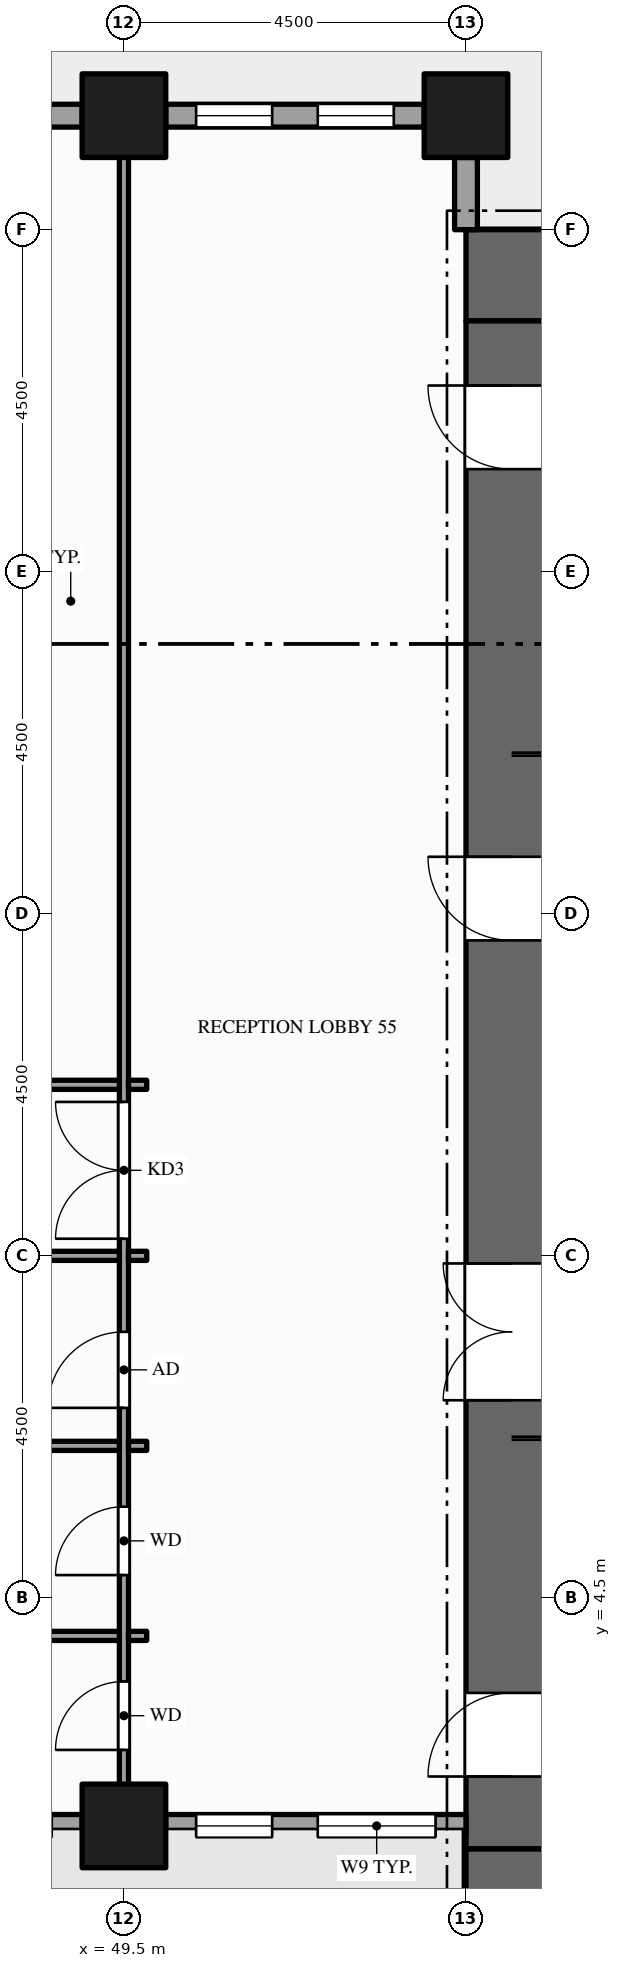
"""IFC4 building model, lengths in metres.
Left out: names, types, materials, properties, quantities, classifications, styles, units other than length and angle.
Written with IfcOpenShell. Run it as: python <this file> out.ifc"""

import sys

from ifc_helpers import new_model, si_unit, direction, frame, frame_2d, origin, origin_2d, place, context, subcontext, project, spatial, rectangle, hollow_rectangle, extrude, element, fill, save


model = new_model("IFC4")
c1 = context("Model", 3, precision=1e-05, world=origin(), true_north=direction((0.0, 1.0)))
c2 = subcontext(c1, "Body", "Model", "MODEL_VIEW")
j1 = project(units=[si_unit("LENGTHUNIT", "METRE"), si_unit("PLANEANGLEUNIT", "RADIAN")], contexts=[c1])
p1 = place(None, origin())
s1 = spatial("IfcSite", under=j1, at=p1, CompositionType="ELEMENT")
p2 = place(p1, origin())
s2 = spatial("IfcBuilding", under=s1, at=p2, CompositionType="ELEMENT")
p3 = place(p2, frame((0.0, 0.0, 29.0)))
s3 = spatial("IfcBuildingStorey", under=s2, at=p3, CompositionType="ELEMENT", Elevation=29.0)
for number, where, z_axis, x_axis in (
    (1, (67.5, 0.6, -0.15), (0.0, 0.0, 1.0), (-1.0, 0.0, 0.0)),
    (2, (54.0, 21.9, -0.15), (0.0, 0.0, 1.0), (1.0, 0.0, 0.0)),
):
    element("IfcWall", number, at=place(p3, frame(where, z_axis=z_axis, x_axis=x_axis)), inside=s3, PredefinedType="SHEAR", context=c2, shape_type="SweptSolid", body=[
        extrude(rectangle(XDim=13.5, YDim=1.2, at=frame_2d((6.75, 0.0))), origin(), (0.0, 0.0, 1.0), 4.0),
    ])
p4 = place(p3, frame((54.6, 1.2, -0.15), z_axis=(0.0, 0.0, 1.0), x_axis=(0.0, 1.0, 0.0)))
e3 = element("IfcWall", 3, at=p4, inside=s3, PredefinedType="SHEAR", context=c2, shape_type="SweptSolid", body=[
    extrude(rectangle(XDim=20.1, YDim=1.2, at=frame_2d((10.05, 0.0))), origin(), (0.0, 0.0, 1.0), 4.0),
])
p5 = place(p4, frame((5.9, 0.0, 0.15)))
e4 = element("IfcOpeningElement", 4, at=p5, cuts=e3, PredefinedType="OPENING", context=c2, shape_type="SweptSolid", body=[
    extrude(rectangle(XDim=1.8, YDim=2.1, at=frame_2d((0.9, 1.05))), frame((0.0, 0.61, 0.0), z_axis=(0.0, -1.0, 0.0), x_axis=(1.0, 0.0, 0.0)), (0.0, 0.0, 1.0), 1.22),
])
p6 = place(p4, frame((11.95, 0.0, 0.15)))
e5 = element("IfcOpeningElement", 5, at=p6, cuts=e3, PredefinedType="OPENING", context=c2, shape_type="SweptSolid", body=[
    extrude(rectangle(XDim=1.1, YDim=2.1, at=frame_2d((0.55, 1.05))), frame((0.0, 0.61, 0.0), z_axis=(0.0, -1.0, 0.0), x_axis=(1.0, 0.0, 0.0)), (0.0, 0.0, 1.0), 1.22),
])
p7 = place(p4, frame((0.95, 0.0, 0.15)))
e6 = element("IfcOpeningElement", 6, at=p7, cuts=e3, PredefinedType="OPENING", context=c2, shape_type="SweptSolid", body=[
    extrude(rectangle(XDim=1.1, YDim=2.1, at=frame_2d((0.55, 1.05))), frame((0.0, 0.61, 0.0), z_axis=(0.0, -1.0, 0.0), x_axis=(1.0, 0.0, 0.0)), (0.0, 0.0, 1.0), 1.22),
])
p8 = place(p4, frame((18.15, 0.0, 0.15)))
e7 = element("IfcOpeningElement", 7, at=p8, cuts=e3, PredefinedType="OPENING", context=c2, shape_type="SweptSolid", body=[
    extrude(rectangle(XDim=1.1, YDim=2.1, at=frame_2d((0.55, 1.05))), frame((0.0, 0.61, 0.0), z_axis=(0.0, -1.0, 0.0), x_axis=(1.0, 0.0, 0.0)), (0.0, 0.0, 1.0), 1.22),
])
for number, where, z_axis, x_axis in (
    (8, (49.5, 1.5, -0.3), (0.0, 0.0, 1.0), (1.0, 0.0, 0.0)),
    (9, (49.5, 24.0, -0.3), (0.0, 0.0, 1.0), (1.0, 0.0, 0.0)),
    (10, (54.0, 24.0, -0.3), (0.0, 0.0, 1.0), (1.0, 0.0, 0.0)),
):
    element("IfcColumn", number, at=place(p3, frame(where, z_axis=z_axis, x_axis=x_axis)), inside=s3, PredefinedType="COLUMN", context=c2, shape_type="SweptSolid", body=[
        extrude(hollow_rectangle(XDim=1.1, YDim=1.1, WallThickness=0.06, at=origin_2d()), origin(), (0.0, 0.0, 1.0), 4.15),
    ])
p9 = place(p3, frame((45.55, 1.5, 0.0), z_axis=(0.0, 0.0, 1.0), x_axis=(1.0, 0.0, 0.0)))
e11 = element("IfcWall", 11, at=p9, inside=s3, PredefinedType="STANDARD", context=c2, shape_type="SweptSolid", body=[
    extrude(rectangle(XDim=3.4, YDim=0.3, at=frame_2d((1.7, 0.0))), origin(), (0.0, 0.0, 1.0), 3.144),
])
p10 = place(p9, frame((0.4, 0.0, 0.9)))
e12 = element("IfcOpeningElement", 12, at=p10, cuts=e11, PredefinedType="OPENING", context=c2, shape_type="SweptSolid", body=[
    extrude(rectangle(XDim=1.0, YDim=2.0, at=frame_2d((0.5, 1.0))), frame((0.0, 0.16, 0.0), z_axis=(0.0, -1.0, 0.0), x_axis=(1.0, 0.0, 0.0)), (0.0, 0.0, 1.0), 0.32),
])
p11 = place(p9, frame((2.0, 0.0, 0.9)))
e13 = element("IfcOpeningElement", 13, at=p11, cuts=e11, PredefinedType="OPENING", context=c2, shape_type="SweptSolid", body=[
    extrude(rectangle(XDim=1.0, YDim=2.0, at=frame_2d((0.5, 1.0))), frame((0.0, 0.16, 0.0), z_axis=(0.0, -1.0, 0.0), x_axis=(1.0, 0.0, 0.0)), (0.0, 0.0, 1.0), 0.32),
])
p12 = place(p3, frame((50.05, 1.5, 0.0), z_axis=(0.0, 0.0, 1.0), x_axis=(1.0, 0.0, 0.0)))
e14 = element("IfcWall", 14, at=p12, inside=s3, PredefinedType="STANDARD", context=c2, shape_type="SweptSolid", body=[
    extrude(rectangle(XDim=3.95, YDim=0.3, at=frame_2d((1.975, 0.0))), origin(), (0.0, 0.0, 1.0), 3.144),
])
p13 = place(p12, frame((0.4, 0.0, 0.9)))
e15 = element("IfcOpeningElement", 15, at=p13, cuts=e14, PredefinedType="OPENING", context=c2, shape_type="SweptSolid", body=[
    extrude(rectangle(XDim=1.0, YDim=2.0, at=frame_2d((0.5, 1.0))), frame((0.0, 0.16, 0.0), z_axis=(0.0, -1.0, 0.0), x_axis=(1.0, 0.0, 0.0)), (0.0, 0.0, 1.0), 0.32),
])
p14 = place(p12, frame((2.0, 0.0, 0.9)))
e16 = element("IfcOpeningElement", 16, at=p14, cuts=e14, PredefinedType="OPENING", context=c2, shape_type="SweptSolid", body=[
    extrude(rectangle(XDim=1.55, YDim=2.0, at=frame_2d((0.775, 1.0))), frame((0.0, 0.16, 0.0), z_axis=(0.0, -1.0, 0.0), x_axis=(1.0, 0.0, 0.0)), (0.0, 0.0, 1.0), 0.32),
])
p15 = place(p3, frame((54.0, 22.5, 0.0), z_axis=(0.0, 0.0, 1.0), x_axis=(0.0, 1.0, 0.0)))
e17 = element("IfcWall", 17, at=p15, inside=s3, PredefinedType="STANDARD", context=c2, shape_type="SweptSolid", body=[
    extrude(rectangle(XDim=0.95, YDim=0.3, at=frame_2d((0.475, 0.0))), origin(), (0.0, 0.0, 1.0), 3.144),
])
p16 = place(p3, frame((53.45, 24.0, 0.0), z_axis=(0.0, 0.0, 1.0), x_axis=(-1.0, 0.0, 0.0)))
e18 = element("IfcWall", 18, at=p16, inside=s3, PredefinedType="STANDARD", context=c2, shape_type="SweptSolid", body=[
    extrude(rectangle(XDim=3.4, YDim=0.3, at=frame_2d((1.7, 0.0))), origin(), (0.0, 0.0, 1.0), 3.144),
])
p17 = place(p16, frame((0.4, 0.0, 0.9)))
e19 = element("IfcOpeningElement", 19, at=p17, cuts=e18, PredefinedType="OPENING", context=c2, shape_type="SweptSolid", body=[
    extrude(rectangle(XDim=1.0, YDim=2.0, at=frame_2d((0.5, 1.0))), frame((0.0, 0.16, 0.0), z_axis=(0.0, -1.0, 0.0), x_axis=(1.0, 0.0, 0.0)), (0.0, 0.0, 1.0), 0.32),
])
p18 = place(p16, frame((2.0, 0.0, 0.9)))
e20 = element("IfcOpeningElement", 20, at=p18, cuts=e18, PredefinedType="OPENING", context=c2, shape_type="SweptSolid", body=[
    extrude(rectangle(XDim=1.0, YDim=2.0, at=frame_2d((0.5, 1.0))), frame((0.0, 0.16, 0.0), z_axis=(0.0, -1.0, 0.0), x_axis=(1.0, 0.0, 0.0)), (0.0, 0.0, 1.0), 0.32),
])
p19 = place(p3, frame((48.95, 24.0, 0.0), z_axis=(0.0, 0.0, 1.0), x_axis=(-1.0, 0.0, 0.0)))
e21 = element("IfcWall", 21, at=p19, inside=s3, PredefinedType="STANDARD", context=c2, shape_type="SweptSolid", body=[
    extrude(rectangle(XDim=3.4, YDim=0.3, at=frame_2d((1.7, 0.0))), origin(), (0.0, 0.0, 1.0), 3.144),
])
p20 = place(p19, frame((0.8, 0.0, 0.0)))
e22 = element("IfcOpeningElement", 22, at=p20, cuts=e21, PredefinedType="OPENING", context=c2, shape_type="SweptSolid", body=[
    extrude(rectangle(XDim=1.8, YDim=2.4, at=frame_2d((0.9, 1.2))), frame((0.0, 0.16, 0.0), z_axis=(0.0, -1.0, 0.0), x_axis=(1.0, 0.0, 0.0)), (0.0, 0.0, 1.0), 0.32),
])
p21 = place(p3, frame((49.5, 1.65, 0.0), z_axis=(0.0, 0.0, 1.0), x_axis=(0.0, 1.0, 0.0)))
e23 = element("IfcWall", 23, at=p21, inside=s3, PredefinedType="PARTITIONING", context=c2, shape_type="SweptSolid", body=[
    extrude(rectangle(XDim=22.2, YDim=0.12, at=frame_2d((11.1, 0.0))), origin(), (0.0, 0.0, 1.0), 2.938),
])
p22 = place(p21, frame((7.575, 0.0, 0.0)))
e24 = element("IfcOpeningElement", 24, at=p22, cuts=e23, PredefinedType="OPENING", context=c2, shape_type="SweptSolid", body=[
    extrude(rectangle(XDim=1.8, YDim=2.1, at=frame_2d((0.9, 1.05))), frame((0.0, 0.07, 0.0), z_axis=(0.0, -1.0, 0.0), x_axis=(1.0, 0.0, 0.0)), (0.0, 0.0, 1.0), 0.14),
])
p23 = place(p21, frame((0.85, 0.0, 0.0)))
e25 = element("IfcOpeningElement", 25, at=p23, cuts=e23, PredefinedType="OPENING", context=c2, shape_type="SweptSolid", body=[
    extrude(rectangle(XDim=0.9, YDim=2.1, at=frame_2d((0.45, 1.05))), frame((0.0, 0.07, 0.0), z_axis=(0.0, -1.0, 0.0), x_axis=(1.0, 0.0, 0.0)), (0.0, 0.0, 1.0), 0.14),
])
p24 = place(p21, frame((3.15, 0.0, 0.0)))
e26 = element("IfcOpeningElement", 26, at=p24, cuts=e23, PredefinedType="OPENING", context=c2, shape_type="SweptSolid", body=[
    extrude(rectangle(XDim=0.9, YDim=2.1, at=frame_2d((0.45, 1.05))), frame((0.0, 0.07, 0.0), z_axis=(0.0, -1.0, 0.0), x_axis=(1.0, 0.0, 0.0)), (0.0, 0.0, 1.0), 0.14),
])
p25 = place(p21, frame((5.35, 0.0, 0.0)))
e27 = element("IfcOpeningElement", 27, at=p25, cuts=e23, PredefinedType="OPENING", context=c2, shape_type="SweptSolid", body=[
    extrude(rectangle(XDim=1.0, YDim=2.1, at=frame_2d((0.5, 1.05))), frame((0.0, 0.07, 0.0), z_axis=(0.0, -1.0, 0.0), x_axis=(1.0, 0.0, 0.0)), (0.0, 0.0, 1.0), 0.14),
])
p26 = place(p3, frame((45.06, 4.0, 0.0), z_axis=(0.0, 0.0, 1.0), x_axis=(1.0, 0.0, 0.0)))
e28 = element("IfcWall", 28, at=p26, inside=s3, PredefinedType="PARTITIONING", context=c2, shape_type="SweptSolid", body=[
    extrude(rectangle(XDim=4.38, YDim=0.12, at=frame_2d((2.19, 0.0))), origin(), (0.0, 0.0, 1.0), 2.938),
])
p27 = place(p3, frame((49.56, 4.0, 0.0), z_axis=(0.0, 0.0, 1.0), x_axis=(1.0, 0.0, 0.0)))
e29 = element("IfcWall", 29, at=p27, inside=s3, PredefinedType="PARTITIONING", context=c2, shape_type="SweptSolid", body=[
    extrude(rectangle(XDim=0.24, YDim=0.12, at=frame_2d((0.12, 0.0))), origin(), (0.0, 0.0, 1.0), 2.938),
])
p28 = place(p3, frame((45.06, 6.5, 0.0), z_axis=(0.0, 0.0, 1.0), x_axis=(1.0, 0.0, 0.0)))
e30 = element("IfcWall", 30, at=p28, inside=s3, PredefinedType="PARTITIONING", context=c2, shape_type="SweptSolid", body=[
    extrude(rectangle(XDim=4.38, YDim=0.12, at=frame_2d((2.19, 0.0))), origin(), (0.0, 0.0, 1.0), 2.938),
])
p29 = place(p3, frame((49.56, 6.5, 0.0), z_axis=(0.0, 0.0, 1.0), x_axis=(1.0, 0.0, 0.0)))
e31 = element("IfcWall", 31, at=p29, inside=s3, PredefinedType="PARTITIONING", context=c2, shape_type="SweptSolid", body=[
    extrude(rectangle(XDim=0.24, YDim=0.12, at=frame_2d((0.12, 0.0))), origin(), (0.0, 0.0, 1.0), 2.938),
])
p30 = place(p3, frame((45.06, 9.0, 0.0), z_axis=(0.0, 0.0, 1.0), x_axis=(1.0, 0.0, 0.0)))
e32 = element("IfcWall", 32, at=p30, inside=s3, PredefinedType="PARTITIONING", context=c2, shape_type="SweptSolid", body=[
    extrude(rectangle(XDim=4.38, YDim=0.12, at=frame_2d((2.19, 0.0))), origin(), (0.0, 0.0, 1.0), 2.938),
])
p31 = place(p3, frame((49.56, 9.0, 0.0), z_axis=(0.0, 0.0, 1.0), x_axis=(1.0, 0.0, 0.0)))
e33 = element("IfcWall", 33, at=p31, inside=s3, PredefinedType="PARTITIONING", context=c2, shape_type="SweptSolid", body=[
    extrude(rectangle(XDim=0.24, YDim=0.12, at=frame_2d((0.12, 0.0))), origin(), (0.0, 0.0, 1.0), 2.938),
])
p32 = place(p3, frame((45.06, 11.25, 0.0), z_axis=(0.0, 0.0, 1.0), x_axis=(1.0, 0.0, 0.0)))
e34 = element("IfcWall", 34, at=p32, inside=s3, PredefinedType="PARTITIONING", context=c2, shape_type="SweptSolid", body=[
    extrude(rectangle(XDim=4.38, YDim=0.12, at=frame_2d((2.19, 0.0))), origin(), (0.0, 0.0, 1.0), 2.938),
])
p33 = place(p32, frame((1.59, 0.0, 0.0)))
e35 = element("IfcOpeningElement", 35, at=p33, cuts=e34, PredefinedType="OPENING", context=c2, shape_type="SweptSolid", body=[
    extrude(rectangle(XDim=1.2, YDim=2.1, at=frame_2d((0.6, 1.05))), frame((0.0, 0.07, 0.0), z_axis=(0.0, -1.0, 0.0), x_axis=(1.0, 0.0, 0.0)), (0.0, 0.0, 1.0), 0.14),
])
p34 = place(p3, frame((49.56, 11.25, 0.0), z_axis=(0.0, 0.0, 1.0), x_axis=(1.0, 0.0, 0.0)))
e36 = element("IfcWall", 36, at=p34, inside=s3, PredefinedType="PARTITIONING", context=c2, shape_type="SweptSolid", body=[
    extrude(rectangle(XDim=0.24, YDim=0.12, at=frame_2d((0.12, 0.0))), origin(), (0.0, 0.0, 1.0), 2.938),
])
p35 = place(p13, origin())
e37 = element("IfcWindow", 37, at=p35, inside=s3, PartitioningType="SINGLE_PANEL", PredefinedType="WINDOW", context=c2, shape_type="SweptSolid", body=[
    extrude(rectangle(XDim=1.0, YDim=2.0, at=frame_2d((0.5, 1.0))), frame((0.0, 0.03, 0.0), z_axis=(0.0, -1.0, 0.0), x_axis=(1.0, 0.0, 0.0)), (0.0, 0.0, 1.0), 0.06),
])
fill(e15, e37)
p36 = place(p14, origin())
e38 = element("IfcWindow", 38, at=p36, inside=s3, PartitioningType="SINGLE_PANEL", PredefinedType="WINDOW", context=c2, shape_type="SweptSolid", body=[
    extrude(rectangle(XDim=1.55, YDim=2.0, at=frame_2d((0.775, 1.0))), frame((0.0, 0.03, 0.0), z_axis=(0.0, -1.0, 0.0), x_axis=(1.0, 0.0, 0.0)), (0.0, 0.0, 1.0), 0.06),
])
fill(e16, e38)
p37 = place(p17, origin())
e39 = element("IfcWindow", 39, at=p37, inside=s3, PartitioningType="SINGLE_PANEL", PredefinedType="WINDOW", context=c2, shape_type="SweptSolid", body=[
    extrude(rectangle(XDim=1.0, YDim=2.0, at=frame_2d((0.5, 1.0))), frame((0.0, 0.03, 0.0), z_axis=(0.0, -1.0, 0.0), x_axis=(1.0, 0.0, 0.0)), (0.0, 0.0, 1.0), 0.06),
])
fill(e19, e39)
p38 = place(p18, origin())
e40 = element("IfcWindow", 40, at=p38, inside=s3, PartitioningType="SINGLE_PANEL", PredefinedType="WINDOW", context=c2, shape_type="SweptSolid", body=[
    extrude(rectangle(XDim=1.0, YDim=2.0, at=frame_2d((0.5, 1.0))), frame((0.0, 0.03, 0.0), z_axis=(0.0, -1.0, 0.0), x_axis=(1.0, 0.0, 0.0)), (0.0, 0.0, 1.0), 0.06),
])
fill(e20, e40)
p39 = place(p5, origin())
e41 = element("IfcDoor", 41, at=p39, inside=s3, OperationType="DOUBLE_DOOR_SINGLE_SWING", PredefinedType="DOOR", context=c2, shape_type="SweptSolid", body=[
    extrude(rectangle(XDim=1.8, YDim=2.1, at=frame_2d((0.9, 1.05))), frame((0.0, 0.025, 0.0), z_axis=(0.0, -1.0, 0.0), x_axis=(1.0, 0.0, 0.0)), (0.0, 0.0, 1.0), 0.05),
])
fill(e4, e41)
p40 = place(p6, origin())
e42 = element("IfcDoor", 42, at=p40, inside=s3, OperationType="SINGLE_SWING_RIGHT", PredefinedType="DOOR", context=c2, shape_type="SweptSolid", body=[
    extrude(rectangle(XDim=1.1, YDim=2.1, at=frame_2d((0.55, 1.05))), frame((0.0, 0.025, 0.0), z_axis=(0.0, -1.0, 0.0), x_axis=(1.0, 0.0, 0.0)), (0.0, 0.0, 1.0), 0.05),
])
fill(e5, e42)
p41 = place(p7, origin())
e43 = element("IfcDoor", 43, at=p41, inside=s3, OperationType="SINGLE_SWING_LEFT", PredefinedType="DOOR", context=c2, shape_type="SweptSolid", body=[
    extrude(rectangle(XDim=1.1, YDim=2.1, at=frame_2d((0.55, 1.05))), frame((0.0, 0.025, 0.0), z_axis=(0.0, -1.0, 0.0), x_axis=(1.0, 0.0, 0.0)), (0.0, 0.0, 1.0), 0.05),
])
fill(e6, e43)
p42 = place(p8, origin())
e44 = element("IfcDoor", 44, at=p42, inside=s3, OperationType="SINGLE_SWING_RIGHT", PredefinedType="DOOR", context=c2, shape_type="SweptSolid", body=[
    extrude(rectangle(XDim=1.1, YDim=2.1, at=frame_2d((0.55, 1.05))), frame((0.0, 0.025, 0.0), z_axis=(0.0, -1.0, 0.0), x_axis=(1.0, 0.0, 0.0)), (0.0, 0.0, 1.0), 0.05),
])
fill(e7, e44)
p43 = place(p22, origin())
e45 = element("IfcDoor", 45, at=p43, inside=s3, OperationType="DOUBLE_DOOR_SINGLE_SWING", PredefinedType="DOOR", context=c2, shape_type="SweptSolid", body=[
    extrude(rectangle(XDim=1.8, YDim=2.1, at=frame_2d((0.9, 1.05))), frame((0.0, 0.025, 0.0), z_axis=(0.0, -1.0, 0.0), x_axis=(1.0, 0.0, 0.0)), (0.0, 0.0, 1.0), 0.05),
])
fill(e24, e45)
p44 = place(p23, origin())
e46 = element("IfcDoor", 46, at=p44, inside=s3, OperationType="SINGLE_SWING_LEFT", PredefinedType="DOOR", context=c2, shape_type="SweptSolid", body=[
    extrude(rectangle(XDim=0.9, YDim=2.1, at=frame_2d((0.45, 1.05))), frame((0.0, 0.025, 0.0), z_axis=(0.0, -1.0, 0.0), x_axis=(1.0, 0.0, 0.0)), (0.0, 0.0, 1.0), 0.05),
])
fill(e25, e46)
p45 = place(p24, origin())
e47 = element("IfcDoor", 47, at=p45, inside=s3, OperationType="SINGLE_SWING_LEFT", PredefinedType="DOOR", context=c2, shape_type="SweptSolid", body=[
    extrude(rectangle(XDim=0.9, YDim=2.1, at=frame_2d((0.45, 1.05))), frame((0.0, 0.025, 0.0), z_axis=(0.0, -1.0, 0.0), x_axis=(1.0, 0.0, 0.0)), (0.0, 0.0, 1.0), 0.05),
])
fill(e26, e47)
p46 = place(p25, origin())
e48 = element("IfcDoor", 48, at=p46, inside=s3, OperationType="SINGLE_SWING_LEFT", PredefinedType="DOOR", context=c2, shape_type="SweptSolid", body=[
    extrude(rectangle(XDim=1.0, YDim=2.1, at=frame_2d((0.5, 1.05))), frame((0.0, 0.025, 0.0), z_axis=(0.0, -1.0, 0.0), x_axis=(1.0, 0.0, 0.0)), (0.0, 0.0, 1.0), 0.05),
])
fill(e27, e48)
save(model, sys.argv[1])
